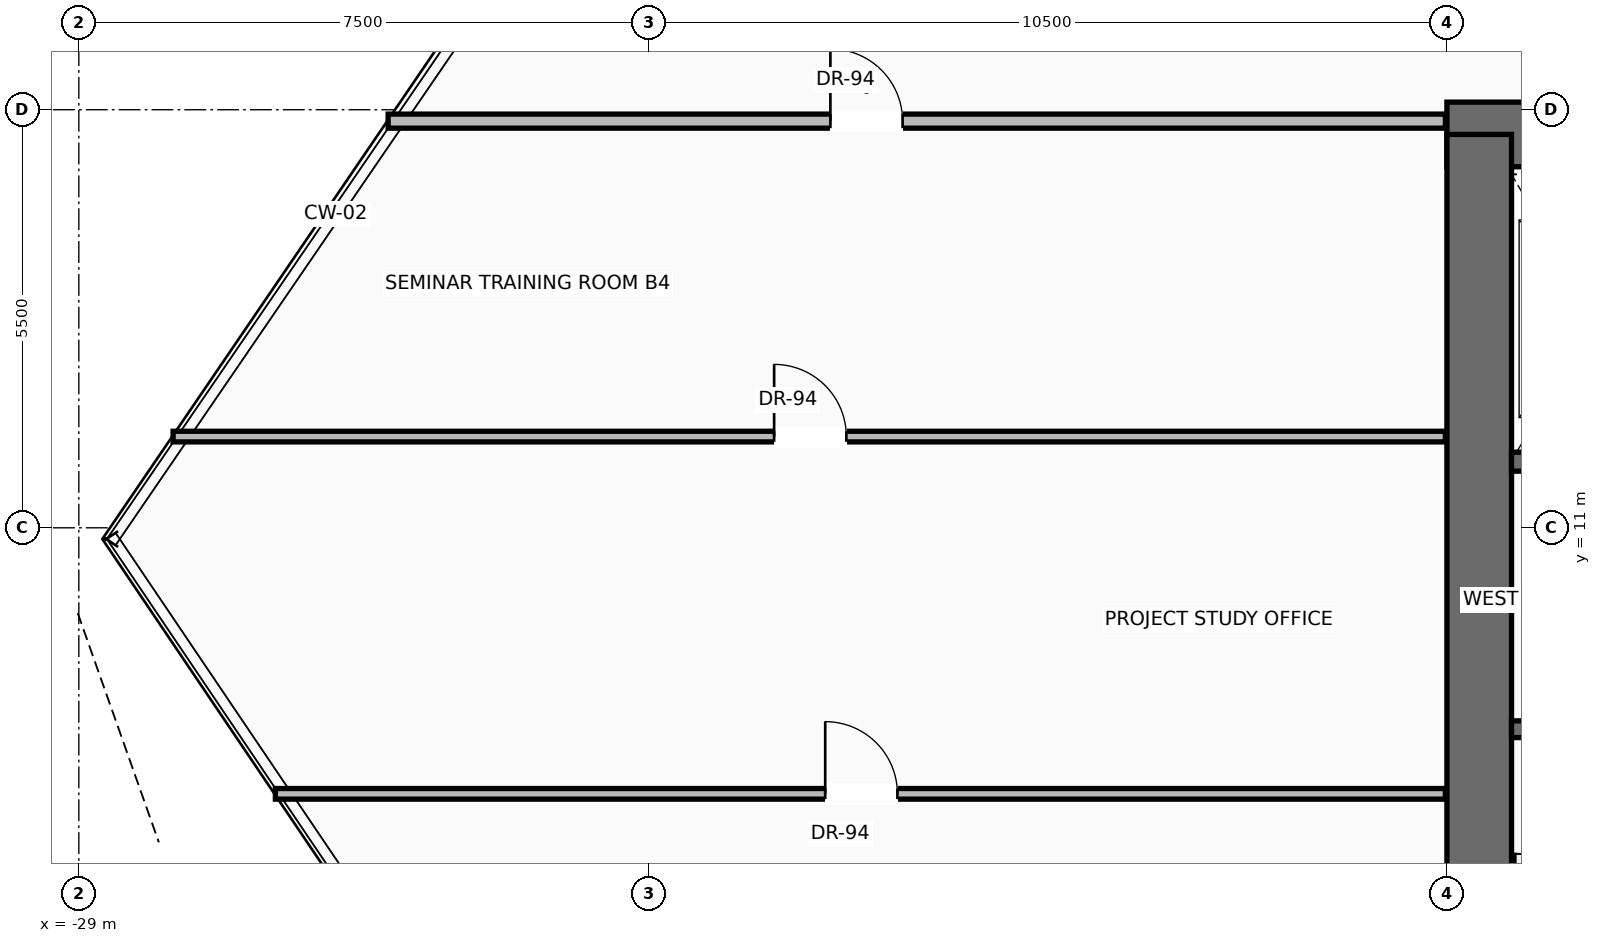
"""IFC4 building model, lengths in metres.
Left out: names, types, materials, properties, quantities, classifications, styles, units other than length and angle.
Written with IfcOpenShell. Run it as: python <this file> out.ifc"""

import sys

from ifc_helpers import new_model, si_unit, direction, frame, frame_2d, origin, place, context, subcontext, project, spatial, rectangle, extrude, source, transform, mapped, element, fill, save


model = new_model("IFC4")
c1 = context("Model", 3, precision=1e-05, world=origin(), true_north=direction((0.0, 1.0)))
c2 = subcontext(c1, "Body", "Model", "MODEL_VIEW")
j1 = project(units=[si_unit("LENGTHUNIT", "METRE"), si_unit("PLANEANGLEUNIT", "RADIAN")], contexts=[c1])
p1 = place(None, origin())
s1 = spatial("IfcSite", under=j1, at=p1, CompositionType="ELEMENT")
p2 = place(p1, origin())
s2 = spatial("IfcBuilding", under=s1, at=p2, CompositionType="ELEMENT")
p3 = place(p2, frame((0.0, 0.0, 38.6)))
s3 = spatial("IfcBuildingStorey", under=s2, at=p3, CompositionType="ELEMENT", Elevation=38.6)
p4 = place(p3, frame((-11.0, 16.175, 0.0), z_axis=(0.0, 0.0, 1.0), x_axis=(1.0, 0.0, 0.0)))
e1 = element("IfcWall", 1, at=p4, inside=s3, PredefinedType="SHEAR", context=c2, shape_type="SweptSolid", body=[
    extrude(rectangle(XDim=22.0, YDim=0.85, at=frame_2d((11.0, 0.0))), origin(), (0.0, 0.0, 1.0), 3.45),
])
p5 = place(p4, frame((3.57, 0.0, 0.0)))
e2 = element("IfcOpeningElement", 2, at=p5, cuts=e1, PredefinedType="OPENING", context=c2, shape_type="SweptSolid", body=[
    extrude(rectangle(XDim=1.3, YDim=2.3, at=frame_2d((0.65, 1.15))), frame((0.0, 0.435, 0.0), z_axis=(0.0, -1.0, 0.0), x_axis=(1.0, 0.0, 0.0)), (0.0, 0.0, 1.0), 0.87),
])
p6 = place(p4, frame((10.0, 0.0, 0.0)))
e3 = element("IfcOpeningElement", 3, at=p6, cuts=e1, PredefinedType="OPENING", context=c2, shape_type="SweptSolid", body=[
    extrude(rectangle(XDim=2.0, YDim=2.4, at=frame_2d((1.0, 1.2))), frame((0.0, 0.435, 0.0), z_axis=(0.0, -1.0, 0.0), x_axis=(1.0, 0.0, 0.0)), (0.0, 0.0, 1.0), 0.87),
])
p7 = place(p3, frame((-10.575, 0.425, 0.0), z_axis=(0.0, 0.0, 1.0), x_axis=(0.0, 1.0, 0.0)))
e4 = element("IfcWall", 4, at=p7, inside=s3, PredefinedType="SHEAR", context=c2, shape_type="SweptSolid", body=[
    extrude(rectangle(XDim=15.75, YDim=0.85, at=frame_2d((7.875, 0.0))), origin(), (0.0, 0.0, 1.0), 3.45),
])
p8 = place(p3, frame((-5.5, 8.35, 0.0), z_axis=(0.0, 0.0, 1.0), x_axis=(-1.0, 0.0, 0.0)))
e5 = element("IfcWall", 5, at=p8, inside=s3, PredefinedType="SOLIDWALL", context=c2, shape_type="SweptSolid", body=[
    extrude(rectangle(XDim=4.65, YDim=0.22, at=frame_2d((2.325, 0.0))), origin(), (0.0, 0.0, 1.0), 3.45),
])
p9 = place(p8, frame((2.5, 0.0, 0.0)))
e6 = element("IfcOpeningElement", 6, at=p9, cuts=e5, PredefinedType="OPENING", context=c2, shape_type="SweptSolid", body=[
    extrude(rectangle(XDim=1.15, YDim=2.2, at=frame_2d((0.575, 1.1))), frame((0.0, 0.12, 0.0), z_axis=(0.0, -1.0, 0.0), x_axis=(1.0, 0.0, 0.0)), (0.0, 0.0, 1.0), 0.24),
])
p10 = place(p3, frame((-5.5, 11.87, 0.0), z_axis=(0.0, 0.0, 1.0), x_axis=(-1.0, 0.0, 0.0)))
e7 = element("IfcWall", 7, at=p10, inside=s3, PredefinedType="SOLIDWALL", context=c2, shape_type="SweptSolid", body=[
    extrude(rectangle(XDim=4.65, YDim=0.25, at=frame_2d((2.325, 0.0))), origin(), (0.0, 0.0, 1.0), 3.45),
])
p11 = place(p10, frame((2.95, 0.0, 0.0)))
e8 = element("IfcOpeningElement", 8, at=p11, cuts=e7, PredefinedType="OPENING", context=c2, shape_type="SweptSolid", body=[
    extrude(rectangle(XDim=1.2, YDim=2.25, at=frame_2d((0.6, 1.125))), frame((0.0, 0.135, 0.0), z_axis=(0.0, -1.0, 0.0), x_axis=(1.0, 0.0, 0.0)), (0.0, 0.0, 1.0), 0.27),
])
p12 = place(p3, frame((-24.93, 16.35, 0.0), z_axis=(0.0, 0.0, 1.0), x_axis=(1.0, 0.0, 0.0)))
e9 = element("IfcWall", 9, at=p12, inside=s3, PredefinedType="PARTITIONING", context=c2, shape_type="SweptSolid", body=[
    extrude(rectangle(XDim=13.91, YDim=0.185, at=frame_2d((6.955, 0.0))), origin(), (0.0, 0.0, 1.0), 2.747),
])
p13 = place(p12, frame((5.819, 0.0, 0.0)))
e10 = element("IfcOpeningElement", 10, at=p13, cuts=e9, PredefinedType="OPENING", context=c2, shape_type="SweptSolid", body=[
    extrude(rectangle(XDim=0.95, YDim=2.2, at=frame_2d((0.475, 1.1))), frame((0.0, 0.103, 0.0), z_axis=(0.0, -1.0, 0.0), x_axis=(1.0, 0.0, 0.0)), (0.0, 0.0, 1.0), 0.205),
])
p14 = place(p3, frame((-26.414, 7.5, 0.0), z_axis=(0.0, 0.0, 1.0), x_axis=(1.0, 0.0, 0.0)))
e11 = element("IfcWall", 11, at=p14, inside=s3, PredefinedType="PARTITIONING", context=c2, shape_type="SweptSolid", body=[
    extrude(rectangle(XDim=15.394, YDim=0.14, at=frame_2d((7.697, 0.0))), origin(), (0.0, 0.0, 1.0), 2.979),
])
p15 = place(p14, frame((7.234, 0.0, 0.0)))
e12 = element("IfcOpeningElement", 12, at=p15, cuts=e11, PredefinedType="OPENING", context=c2, shape_type="SweptSolid", body=[
    extrude(rectangle(XDim=0.95, YDim=2.2, at=frame_2d((0.475, 1.1))), frame((0.0, 0.08, 0.0), z_axis=(0.0, -1.0, 0.0), x_axis=(1.0, 0.0, 0.0)), (0.0, 0.0, 1.0), 0.16),
])
p16 = place(p3, frame((-27.76, 12.2, 0.0), z_axis=(0.0, 0.0, 1.0), x_axis=(1.0, 0.0, 0.0)))
e13 = element("IfcWall", 13, at=p16, inside=s3, PredefinedType="PARTITIONING", context=c2, shape_type="SweptSolid", body=[
    extrude(rectangle(XDim=16.74, YDim=0.14, at=frame_2d((8.37, 0.0))), origin(), (0.0, 0.0, 1.0), 3.442),
])
p17 = place(p16, frame((7.908, 0.0, 0.0)))
e14 = element("IfcOpeningElement", 14, at=p17, cuts=e13, PredefinedType="OPENING", context=c2, shape_type="SweptSolid", body=[
    extrude(rectangle(XDim=0.95, YDim=2.2, at=frame_2d((0.475, 1.1))), frame((0.0, 0.08, 0.0), z_axis=(0.0, -1.0, 0.0), x_axis=(1.0, 0.0, 0.0)), (0.0, 0.0, 1.0), 0.16),
])
m1 = source(origin(), c2, "Body", "SweptSolid", [
    extrude(rectangle(XDim=0.95, YDim=2.2, at=frame_2d((0.475, 1.1))), frame((0.0, 0.025, 0.0), z_axis=(0.0, -1.0, 0.0), x_axis=(1.0, 0.0, 0.0)), (0.0, 0.0, 1.0), 0.05),
])
p18 = place(p13, origin())
e15 = element("IfcDoor", 15, at=p18, inside=s3, OperationType="SINGLE_SWING_LEFT", PredefinedType="DOOR", context=c2, shape_type="MappedRepresentation", body=[
    mapped(m1, transform((0.0, 0.0, 0.0), scale=1.0)),
])
fill(e10, e15)
p19 = place(p17, origin())
e16 = element("IfcDoor", 16, at=p19, inside=s3, OperationType="SINGLE_SWING_LEFT", PredefinedType="DOOR", context=c2, shape_type="MappedRepresentation", body=[
    mapped(m1, transform((0.0, 0.0, 0.0), scale=1.0)),
])
fill(e14, e16)
p20 = place(p15, origin())
e17 = element("IfcDoor", 17, at=p20, inside=s3, OperationType="SINGLE_SWING_LEFT", PredefinedType="DOOR", context=c2, shape_type="MappedRepresentation", body=[
    mapped(m1, transform((0.0, 0.0, 0.0), scale=1.0)),
])
fill(e12, e17)
save(model, sys.argv[1])
